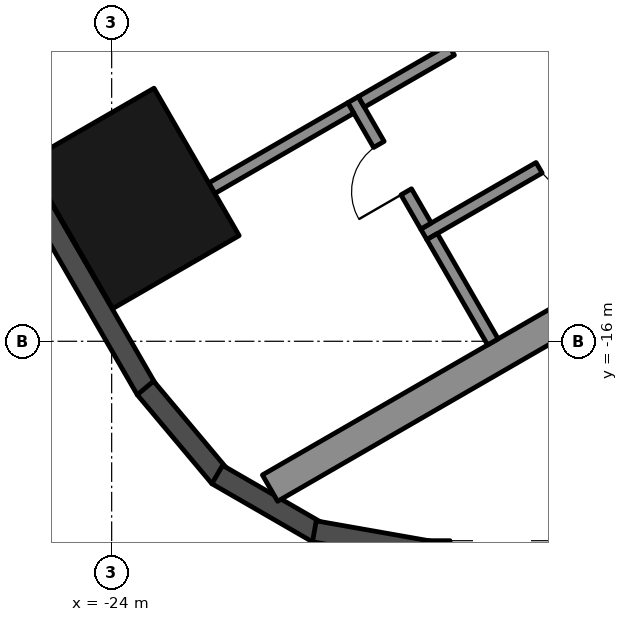
"""IFC4 building model, lengths in metres.
Left out: names, types, materials, properties, quantities, classifications, styles, units other than length and angle.
Written with IfcOpenShell. Run it as: python <this file> out.ifc"""

import sys

from ifc_helpers import new_model, si_unit, direction, frame, frame_2d, origin, origin_2d, place, context, subcontext, project, spatial, rectangle, hollow_rectangle, extrude, element, fill, save


model = new_model("IFC4")
c1 = context("Model", 3, precision=1e-05, world=origin(), true_north=direction((0.0, 1.0)))
c2 = subcontext(c1, "Body", "Model", "MODEL_VIEW")
j1 = project(units=[si_unit("LENGTHUNIT", "METRE"), si_unit("PLANEANGLEUNIT", "RADIAN")], contexts=[c1])
p1 = place(None, origin())
s1 = spatial("IfcSite", under=j1, at=p1, CompositionType="ELEMENT")
p2 = place(p1, origin())
s2 = spatial("IfcBuilding", under=s1, at=p2, CompositionType="ELEMENT")
p3 = place(p2, frame((0.0, 0.0, 83.5)))
s3 = spatial("IfcBuildingStorey", under=s2, at=p3, CompositionType="ELEMENT", Elevation=83.5)
p4 = place(p3, frame((-23.643, -13.65, 0.0), z_axis=(0.0, 0.0, 1.0), x_axis=(-0.5, 0.866025403784, 0.0)))
e1 = element("IfcColumn", 1, at=p4, inside=s3, PredefinedType="COLUMN", context=c2, shape_type="SweptSolid", body=[
    extrude(hollow_rectangle(XDim=2.8, YDim=2.4, WallThickness=0.07, at=origin_2d()), origin(), (0.0, 0.0, 1.0), 3.7),
])
p5 = place(p3, frame((-26.257, -11.893, 0.0), z_axis=(0.0, 0.0, 1.0), x_axis=(0.500018773155, -0.866014564827, 0.0)))
e2 = element("IfcWall", 2, at=p5, inside=s3, PredefinedType="SOLIDWALL", context=c2, shape_type="SweptSolid", body=[
    extrude(rectangle(XDim=5.658, YDim=0.35, at=frame_2d((2.829, 0.0))), origin(), (0.0, 0.0, 1.0), 3.55),
])
for number, where, z_axis, x_axis in (
    (3, (-23.445, -16.768, 0.0), (0.0, 0.0, 1.0), (0.643, -0.766, 0.0)),
    (4, (-22.264, -18.192, 0.0), (0.0, 0.0, 1.0), (0.866, -0.5, 0.0)),
):
    element("IfcWall", number, at=place(p3, frame(where, z_axis=z_axis, x_axis=x_axis)), inside=s3, PredefinedType="SOLIDWALL", context=c2, shape_type="SweptSolid", body=[
        extrude(rectangle(XDim=1.91, YDim=0.35, at=frame_2d((0.955, 0.0))), origin(), (0.0, 0.0, 1.0), 3.55),
    ])
p6 = place(p3, frame((-20.667, -19.126, 0.0), z_axis=(0.0, 0.0, 1.0), x_axis=(0.984798995425, -0.173697837091, 0.0)))
e5 = element("IfcWall", 5, at=p6, inside=s3, PredefinedType="SOLIDWALL", context=c2, shape_type="SweptSolid", body=[
    extrude(rectangle(XDim=1.91, YDim=0.35, at=frame_2d((0.955, 0.0))), origin(), (0.0, 0.0, 1.0), 3.55),
])
p7 = place(p3, frame((-18.816, -19.455, 0.0), z_axis=(0.0, 0.0, 1.0), x_axis=(1.0, 0.0, 0.0)))
e6 = element("IfcWall", 6, at=p7, inside=s3, PredefinedType="SOLIDWALL", context=c2, shape_type="SweptSolid", body=[
    extrude(rectangle(XDim=11.816, YDim=0.35, at=frame_2d((5.908, 0.0))), origin(), (0.0, 0.0, 1.0), 3.55),
])
p8 = place(p7, frame((0.381, 0.0, 0.3)))
e7 = element("IfcOpeningElement", 7, at=p8, cuts=e6, PredefinedType="OPENING", context=c2, shape_type="SweptSolid", body=[
    extrude(rectangle(XDim=1.7, YDim=2.65, at=frame_2d((0.85, 1.325))), frame((0.0, 0.185, 0.0), z_axis=(0.0, -1.0, 0.0), x_axis=(1.0, 0.0, 0.0)), (0.0, 0.0, 1.0), 0.37),
])
p9 = place(p7, frame((7.665, 0.0, 0.0)))
e8 = element("IfcOpeningElement", 8, at=p9, cuts=e6, PredefinedType="OPENING", context=c2, shape_type="SweptSolid", body=[
    extrude(rectangle(XDim=2.4, YDim=2.4, at=frame_2d((1.2, 1.2))), frame((0.0, 0.185, 0.0), z_axis=(0.0, -1.0, 0.0), x_axis=(1.0, 0.0, 0.0)), (0.0, 0.0, 1.0), 0.37),
])
p10 = place(p7, frame((3.866, 0.0, 0.3)))
e9 = element("IfcOpeningElement", 9, at=p10, cuts=e6, PredefinedType="OPENING", context=c2, shape_type="SweptSolid", body=[
    extrude(rectangle(XDim=1.5, YDim=2.65, at=frame_2d((0.75, 1.325))), frame((0.0, 0.185, 0.0), z_axis=(0.0, -1.0, 0.0), x_axis=(1.0, 0.0, 0.0)), (0.0, 0.0, 1.0), 0.37),
])
p11 = place(p7, frame((5.666, 0.0, 0.3)))
e10 = element("IfcOpeningElement", 10, at=p11, cuts=e6, PredefinedType="OPENING", context=c2, shape_type="SweptSolid", body=[
    extrude(rectangle(XDim=1.5, YDim=2.65, at=frame_2d((0.75, 1.325))), frame((0.0, 0.185, 0.0), z_axis=(0.0, -1.0, 0.0), x_axis=(1.0, 0.0, 0.0)), (0.0, 0.0, 1.0), 0.37),
])
p12 = place(p3, frame((-8.547, -10.997, 0.0), z_axis=(0.0, 0.0, 1.0), x_axis=(-0.866025009528, -0.500000682871, 0.0)))
e11 = element("IfcWall", 11, at=p12, inside=s3, PredefinedType="SHEAR", context=c2, shape_type="SweptSolid", body=[
    extrude(rectangle(XDim=14.837, YDim=0.5, at=frame_2d((7.418, 0.0))), origin(), (0.0, 0.0, 1.0), 3.5),
])
p13 = place(p3, frame((-10.068, -9.162, 0.0), z_axis=(0.0, 0.0, 1.0), x_axis=(-0.866032725843, -0.499987317609, 0.0)))
e12 = element("IfcWall", 12, at=p13, inside=s3, PredefinedType="SHEAR", context=c2, shape_type="SweptSolid", body=[
    extrude(rectangle(XDim=10.16, YDim=0.2, at=frame_2d((5.08, 0.0))), origin(), (0.0, 0.0, 1.0), 3.5),
])
p14 = place(p13, frame((1.99, 0.0, 0.0)))
e13 = element("IfcOpeningElement", 13, at=p14, cuts=e12, PredefinedType="OPENING", context=c2, shape_type="SweptSolid", body=[
    extrude(rectangle(XDim=0.9, YDim=2.1, at=frame_2d((0.45, 1.05))), frame((0.0, 0.11, 0.0), z_axis=(0.0, -1.0, 0.0), x_axis=(1.0, 0.0, 0.0)), (0.0, 0.0, 1.0), 0.22),
])
p15 = place(p13, frame((7.07, 0.0, 0.0)))
e14 = element("IfcOpeningElement", 14, at=p15, cuts=e12, PredefinedType="OPENING", context=c2, shape_type="SweptSolid", body=[
    extrude(rectangle(XDim=0.9, YDim=2.1, at=frame_2d((0.45, 1.05))), frame((0.0, 0.11, 0.0), z_axis=(0.0, -1.0, 0.0), x_axis=(1.0, 0.0, 0.0)), (0.0, 0.0, 1.0), 0.22),
])
p16 = place(p3, frame((-20.031, -12.026, 0.0), z_axis=(0.0, 0.0, 1.0), x_axis=(0.500033551112, -0.866006032174, 0.0)))
e15 = element("IfcWall", 15, at=p16, inside=s3, PredefinedType="SHEAR", context=c2, shape_type="SweptSolid", body=[
    extrude(rectangle(XDim=2.4, YDim=0.2, at=frame_2d((1.2, 0.0))), origin(), (0.0, 0.0, 1.0), 3.5),
])
p17 = place(p16, frame((0.85, 0.0, 0.0)))
e16 = element("IfcOpeningElement", 16, at=p17, cuts=e15, PredefinedType="OPENING", context=c2, shape_type="SweptSolid", body=[
    extrude(rectangle(XDim=0.9, YDim=2.1, at=frame_2d((0.45, 1.05))), frame((0.0, 0.11, 0.0), z_axis=(0.0, -1.0, 0.0), x_axis=(1.0, 0.0, 0.0)), (0.0, 0.0, 1.0), 0.22),
])
p18 = place(p3, frame((-18.413, -11.208, 0.0), z_axis=(0.0, 0.0, 1.0), x_axis=(-0.866038183914, -0.499977863513, 0.0)))
e17 = element("IfcWall", 17, at=p18, inside=s3, PredefinedType="SHEAR", context=c2, shape_type="SweptSolid", body=[
    extrude(rectangle(XDim=1.71, YDim=0.2, at=frame_2d((0.855, 0.0))), origin(), (0.0, 0.0, 1.0), 3.5),
])
p19 = place(p3, frame((-18.73, -14.278, 0.0), z_axis=(0.0, 0.0, 1.0), x_axis=(0.50002537861, -0.866010750942, 0.0)))
e18 = element("IfcWall", 18, at=p19, inside=s3, PredefinedType="SHEAR", context=c2, shape_type="SweptSolid", body=[
    extrude(rectangle(XDim=2.0, YDim=0.2, at=frame_2d((1.0, 0.0))), origin(), (0.0, 0.0, 1.0), 3.5),
])
p20 = place(p3, frame((-20.067, -12.163, 0.0), z_axis=(0.0, 0.0, 1.0), x_axis=(-0.866060851709, -0.499938597367, 0.0)))
e19 = element("IfcWall", 19, at=p20, inside=s3, PredefinedType="SHEAR", context=c2, shape_type="SweptSolid", body=[
    extrude(rectangle(XDim=2.64, YDim=0.2, at=frame_2d((1.32, 0.0))), origin(), (0.0, 0.0, 1.0), 3.5),
])
p21 = place(p15, origin())
e20 = element("IfcDoor", 20, at=p21, inside=s3, OperationType="SINGLE_SWING_LEFT", PredefinedType="DOOR", context=c2, shape_type="SweptSolid", body=[
    extrude(rectangle(XDim=0.9, YDim=2.1, at=frame_2d((0.45, 1.05))), frame((0.0, 0.025, 0.0), z_axis=(0.0, -1.0, 0.0), x_axis=(1.0, 0.0, 0.0)), (0.0, 0.0, 1.0), 0.05),
])
fill(e14, e20)
p22 = place(p17, frame((0.9, 0.0, 0.0), z_axis=(0.0, 0.0, 1.0), x_axis=(-1.0, 0.0, 0.0)))
e21 = element("IfcDoor", 21, at=p22, inside=s3, OperationType="SINGLE_SWING_LEFT", PredefinedType="DOOR", context=c2, shape_type="SweptSolid", body=[
    extrude(rectangle(XDim=0.9, YDim=2.1, at=frame_2d((0.45, 1.05))), frame((0.0, 0.025, 0.0), z_axis=(0.0, -1.0, 0.0), x_axis=(1.0, 0.0, 0.0)), (0.0, 0.0, 1.0), 0.05),
])
fill(e16, e21)
save(model, sys.argv[1])
